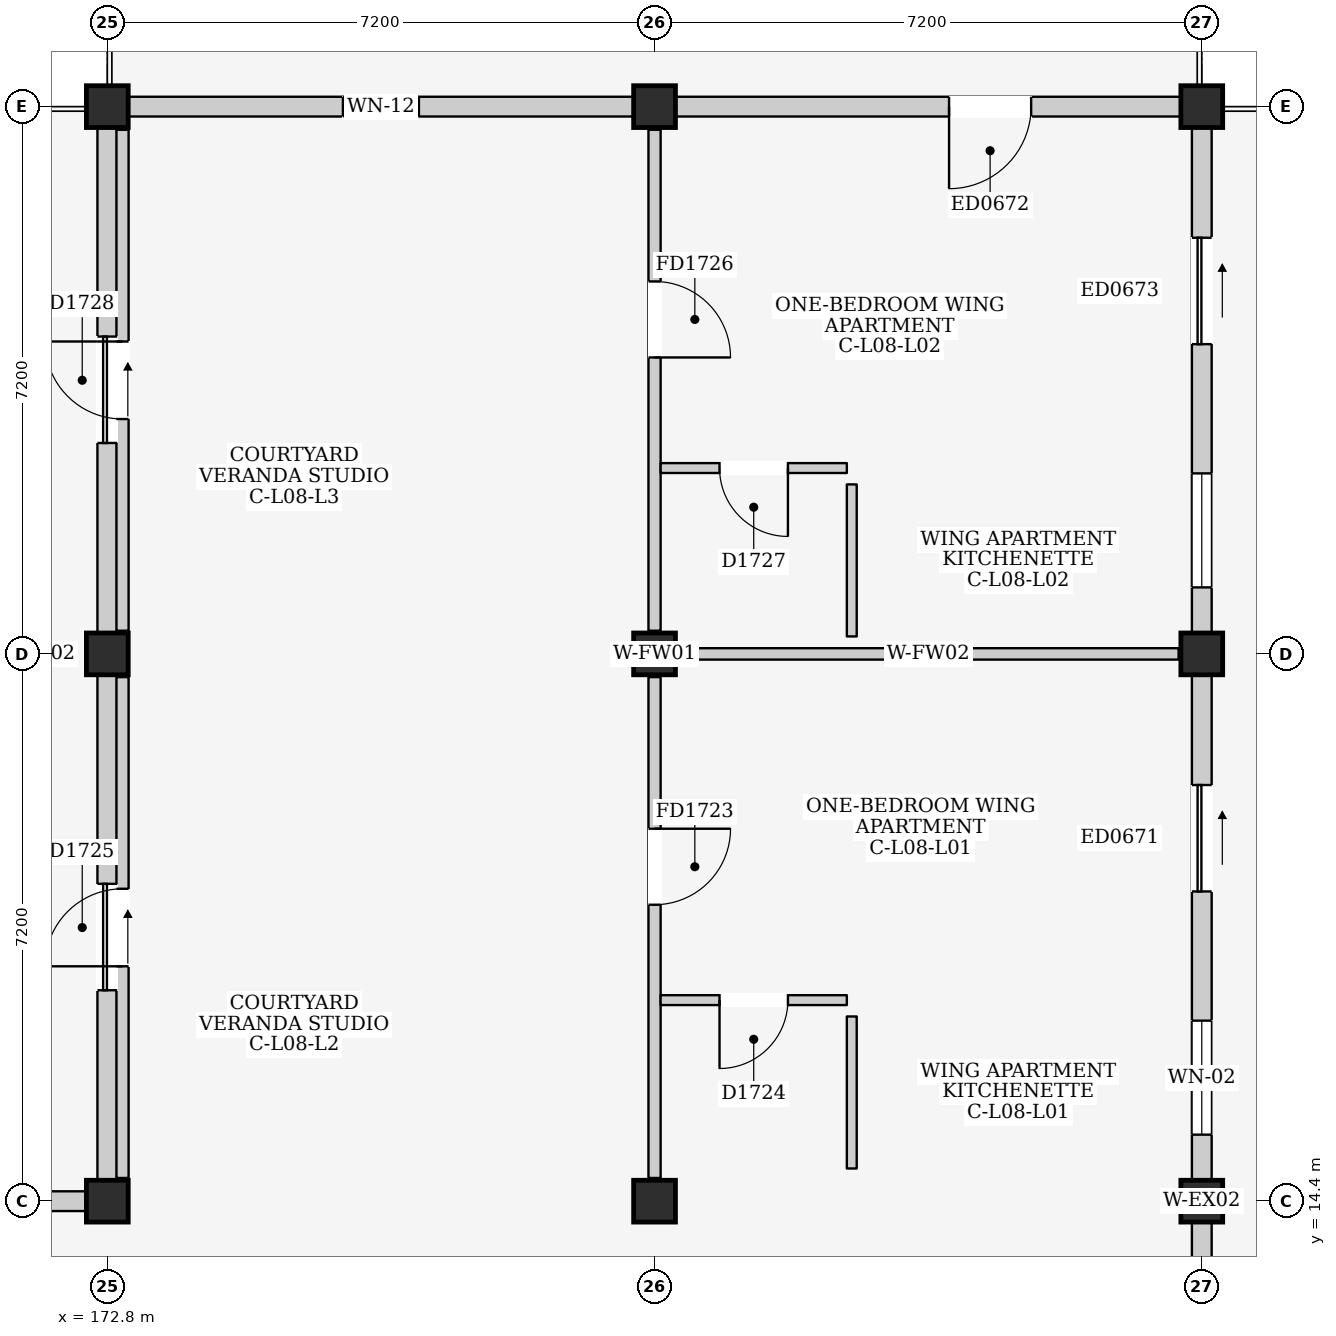
"""IFC4 building model, lengths in metres.
Left out: names, types, materials, properties, quantities, classifications, styles, units other than length and angle.
Written with IfcOpenShell. Run it as: python <this file> out.ifc"""

import sys

from ifc_helpers import new_model, si_unit, direction, frame, frame_2d, origin, origin_2d, place, context, subcontext, project, spatial, rectangle, extrude, element, fill, save


model = new_model("IFC4")
c1 = context("Model", 3, precision=1e-05, world=origin(), true_north=direction((0.0, 1.0)))
c2 = subcontext(c1, "Body", "Model", "MODEL_VIEW")
j1 = project(units=[si_unit("LENGTHUNIT", "METRE"), si_unit("PLANEANGLEUNIT", "RADIAN")], contexts=[c1])
p1 = place(None, origin())
s1 = spatial("IfcSite", under=j1, at=p1, CompositionType="ELEMENT")
p2 = place(p1, origin())
s2 = spatial("IfcBuilding", under=s1, at=p2, CompositionType="ELEMENT")
p3 = place(p2, frame((0.0, 0.0, 28.3)))
s3 = spatial("IfcBuildingStorey", under=s2, at=p3, CompositionType="ELEMENT", Elevation=28.3)
for number, where, z_axis, x_axis in (
    (1, (172.8, 14.4, 0.0), (0.0, 0.0, 1.0), (1.0, 0.0, 0.0)),
    (2, (172.8, 21.6, 0.0), (0.0, 0.0, 1.0), (1.0, 0.0, 0.0)),
    (3, (172.8, 28.8, 0.0), (0.0, 0.0, 1.0), (1.0, 0.0, 0.0)),
    (4, (180.0, 14.4, 0.0), (0.0, 0.0, 1.0), (1.0, 0.0, 0.0)),
    (5, (180.0, 21.6, 0.0), (0.0, 0.0, 1.0), (1.0, 0.0, 0.0)),
    (6, (180.0, 28.8, 0.0), (0.0, 0.0, 1.0), (1.0, 0.0, 0.0)),
    (7, (187.2, 14.4, 0.0), (0.0, 0.0, 1.0), (1.0, 0.0, 0.0)),
    (8, (187.2, 21.6, 0.0), (0.0, 0.0, 1.0), (1.0, 0.0, 0.0)),
    (9, (187.2, 28.8, 0.0), (0.0, 0.0, 1.0), (1.0, 0.0, 0.0)),
):
    element("IfcColumn", number, at=place(p3, frame(where, z_axis=z_axis, x_axis=x_axis)), inside=s3, PredefinedType="COLUMN", context=c2, shape_type="SweptSolid", body=[
        extrude(rectangle(XDim=0.55, YDim=0.55, at=origin_2d()), origin(), (0.0, 0.0, 1.0), 3.2),
    ])
p4 = place(p3, frame((165.875, 14.4, 0.0), z_axis=(0.0, 0.0, 1.0), x_axis=(1.0, 0.0, 0.0)))
e10 = element("IfcWall", 10, at=p4, inside=s3, PredefinedType="ELEMENTEDWALL", context=c2, shape_type="SweptSolid", body=[
    extrude(rectangle(XDim=6.65, YDim=0.26, at=frame_2d((3.325, 0.0))), origin(), (0.0, 0.0, 1.0), 2.335),
])
p5 = place(p4, frame((2.825, 0.0, 1.2)))
e11 = element("IfcOpeningElement", 11, at=p5, cuts=e10, PredefinedType="OPENING", context=c2, shape_type="SweptSolid", body=[
    extrude(rectangle(XDim=1.0, YDim=0.9, at=frame_2d((0.5, 0.45))), frame((0.0, 0.145, 0.0), z_axis=(0.0, -1.0, 0.0), x_axis=(1.0, 0.0, 0.0)), (0.0, 0.0, 1.0), 0.29),
])
p6 = place(p3, frame((172.8, 14.675, 0.0), z_axis=(0.0, 0.0, 1.0), x_axis=(0.0, 1.0, 0.0)))
e12 = element("IfcWall", 12, at=p6, inside=s3, PredefinedType="ELEMENTEDWALL", context=c2, shape_type="SweptSolid", body=[
    extrude(rectangle(XDim=6.65, YDim=0.26, at=frame_2d((3.325, 0.0))), origin(), (0.0, 0.0, 1.0), 2.435),
])
p7 = place(p6, frame((2.5, 0.0, 0.0)))
e13 = element("IfcOpeningElement", 13, at=p7, cuts=e12, PredefinedType="OPENING", context=c2, shape_type="SweptSolid", body=[
    extrude(rectangle(XDim=1.4, YDim=2.1, at=frame_2d((0.7, 1.05))), frame((0.0, 0.145, 0.0), z_axis=(0.0, -1.0, 0.0), x_axis=(1.0, 0.0, 0.0)), (0.0, 0.0, 1.0), 0.29),
])
p8 = place(p3, frame((173.075, 28.8, 0.0), z_axis=(0.0, 0.0, 1.0), x_axis=(1.0, 0.0, 0.0)))
e14 = element("IfcWall", 14, at=p8, inside=s3, PredefinedType="ELEMENTEDWALL", context=c2, shape_type="SweptSolid", body=[
    extrude(rectangle(XDim=6.65, YDim=0.26, at=frame_2d((3.325, 0.0))), origin(), (0.0, 0.0, 1.0), 2.335),
])
p9 = place(p8, frame((2.825, 0.0, 1.1)))
e15 = element("IfcOpeningElement", 15, at=p9, cuts=e14, PredefinedType="OPENING", context=c2, shape_type="SweptSolid", body=[
    extrude(rectangle(XDim=1.0, YDim=0.9, at=frame_2d((0.5, 0.45))), frame((0.0, 0.145, 0.0), z_axis=(0.0, -1.0, 0.0), x_axis=(1.0, 0.0, 0.0)), (0.0, 0.0, 1.0), 0.29),
])
p10 = place(p3, frame((172.8, 21.875, 0.0), z_axis=(0.0, 0.0, 1.0), x_axis=(0.0, 1.0, 0.0)))
e16 = element("IfcWall", 16, at=p10, inside=s3, PredefinedType="ELEMENTEDWALL", context=c2, shape_type="SweptSolid", body=[
    extrude(rectangle(XDim=6.65, YDim=0.26, at=frame_2d((3.325, 0.0))), origin(), (0.0, 0.0, 1.0), 2.435),
])
p11 = place(p10, frame((2.5, 0.0, 0.0)))
e17 = element("IfcOpeningElement", 17, at=p11, cuts=e16, PredefinedType="OPENING", context=c2, shape_type="SweptSolid", body=[
    extrude(rectangle(XDim=1.4, YDim=2.1, at=frame_2d((0.7, 1.05))), frame((0.0, 0.145, 0.0), z_axis=(0.0, -1.0, 0.0), x_axis=(1.0, 0.0, 0.0)), (0.0, 0.0, 1.0), 0.29),
])
p12 = place(p3, frame((187.2, 7.475, 0.0), z_axis=(0.0, 0.0, 1.0), x_axis=(0.0, 1.0, 0.0)))
e18 = element("IfcWall", 18, at=p12, inside=s3, PredefinedType="ELEMENTEDWALL", context=c2, shape_type="SweptSolid", body=[
    extrude(rectangle(XDim=6.65, YDim=0.26, at=frame_2d((3.325, 0.0))), origin(), (0.0, 0.0, 1.0), 2.485),
])
p13 = place(p12, frame((3.65, 0.0, 0.0)))
e19 = element("IfcOpeningElement", 19, at=p13, cuts=e18, PredefinedType="OPENING", context=c2, shape_type="SweptSolid", body=[
    extrude(rectangle(XDim=1.4, YDim=2.1, at=frame_2d((0.7, 1.05))), frame((0.0, 0.145, 0.0), z_axis=(0.0, -1.0, 0.0), x_axis=(1.0, 0.0, 0.0)), (0.0, 0.0, 1.0), 0.29),
])
p14 = place(p3, frame((187.2, 14.675, 0.0), z_axis=(0.0, 0.0, 1.0), x_axis=(0.0, 1.0, 0.0)))
e20 = element("IfcWall", 20, at=p14, inside=s3, PredefinedType="ELEMENTEDWALL", context=c2, shape_type="SweptSolid", body=[
    extrude(rectangle(XDim=6.65, YDim=0.26, at=frame_2d((3.325, 0.0))), origin(), (0.0, 0.0, 1.0), 2.485),
])
p15 = place(p14, frame((3.8, 0.0, 0.0)))
e21 = element("IfcOpeningElement", 21, at=p15, cuts=e20, PredefinedType="OPENING", context=c2, shape_type="SweptSolid", body=[
    extrude(rectangle(XDim=1.4, YDim=2.1, at=frame_2d((0.7, 1.05))), frame((0.0, 0.145, 0.0), z_axis=(0.0, -1.0, 0.0), x_axis=(1.0, 0.0, 0.0)), (0.0, 0.0, 1.0), 0.29),
])
p16 = place(p14, frame((0.6, 0.0, 0.875)))
e22 = element("IfcOpeningElement", 22, at=p16, cuts=e20, PredefinedType="OPENING", context=c2, shape_type="SweptSolid", body=[
    extrude(rectangle(XDim=1.5, YDim=1.5, at=frame_2d((0.75, 0.75))), frame((0.0, 0.145, 0.0), z_axis=(0.0, -1.0, 0.0), x_axis=(1.0, 0.0, 0.0)), (0.0, 0.0, 1.0), 0.29),
])
p17 = place(p3, frame((180.275, 28.8, 0.0), z_axis=(0.0, 0.0, 1.0), x_axis=(1.0, 0.0, 0.0)))
e23 = element("IfcWall", 23, at=p17, inside=s3, PredefinedType="ELEMENTEDWALL", context=c2, shape_type="SweptSolid", body=[
    extrude(rectangle(XDim=6.65, YDim=0.26, at=frame_2d((3.325, 0.0))), origin(), (0.0, 0.0, 1.0), 2.335),
])
p18 = place(p17, frame((3.6, 0.0, 0.0)))
e24 = element("IfcOpeningElement", 24, at=p18, cuts=e23, PredefinedType="OPENING", context=c2, shape_type="SweptSolid", body=[
    extrude(rectangle(XDim=1.08, YDim=2.12, at=frame_2d((0.54, 1.06))), frame((0.0, 0.145, 0.0), z_axis=(0.0, -1.0, 0.0), x_axis=(1.0, 0.0, 0.0)), (0.0, 0.0, 1.0), 0.29),
])
p19 = place(p3, frame((187.2, 21.875, 0.0), z_axis=(0.0, 0.0, 1.0), x_axis=(0.0, 1.0, 0.0)))
e25 = element("IfcWall", 25, at=p19, inside=s3, PredefinedType="ELEMENTEDWALL", context=c2, shape_type="SweptSolid", body=[
    extrude(rectangle(XDim=6.65, YDim=0.26, at=frame_2d((3.325, 0.0))), origin(), (0.0, 0.0, 1.0), 2.485),
])
p20 = place(p19, frame((3.8, 0.0, 0.0)))
e26 = element("IfcOpeningElement", 26, at=p20, cuts=e25, PredefinedType="OPENING", context=c2, shape_type="SweptSolid", body=[
    extrude(rectangle(XDim=1.4, YDim=2.1, at=frame_2d((0.7, 1.05))), frame((0.0, 0.145, 0.0), z_axis=(0.0, -1.0, 0.0), x_axis=(1.0, 0.0, 0.0)), (0.0, 0.0, 1.0), 0.29),
])
p21 = place(p19, frame((0.6, 0.0, 0.875)))
e27 = element("IfcOpeningElement", 27, at=p21, cuts=e25, PredefinedType="OPENING", context=c2, shape_type="SweptSolid", body=[
    extrude(rectangle(XDim=1.5, YDim=1.5, at=frame_2d((0.75, 0.75))), frame((0.0, 0.145, 0.0), z_axis=(0.0, -1.0, 0.0), x_axis=(1.0, 0.0, 0.0)), (0.0, 0.0, 1.0), 0.29),
])
p22 = place(p3, frame((180.0, 14.705, 0.0), z_axis=(0.0, 0.0, 1.0), x_axis=(0.0, 1.0, 0.0)))
e28 = element("IfcWall", 28, at=p22, inside=s3, PredefinedType="PARTITIONING", context=c2, shape_type="SweptSolid", body=[
    extrude(rectangle(XDim=6.59, YDim=0.16, at=frame_2d((3.295, 0.0))), origin(), (0.0, 0.0, 1.0), 2.435),
])
p23 = place(p22, frame((3.595, 0.0, 0.0)))
e29 = element("IfcOpeningElement", 29, at=p23, cuts=e28, PredefinedType="OPENING", context=c2, shape_type="SweptSolid", body=[
    extrude(rectangle(XDim=1.0, YDim=2.15, at=frame_2d((0.5, 1.075))), frame((0.0, 0.095, 0.0), z_axis=(0.0, -1.0, 0.0), x_axis=(1.0, 0.0, 0.0)), (0.0, 0.0, 1.0), 0.19),
])
p24 = place(p3, frame((180.305, 21.6, 0.0), z_axis=(0.0, 0.0, 1.0), x_axis=(1.0, 0.0, 0.0)))
e30 = element("IfcWall", 30, at=p24, inside=s3, PredefinedType="PARTITIONING", context=c2, shape_type="SweptSolid", body=[
    extrude(rectangle(XDim=6.59, YDim=0.15, at=frame_2d((3.295, 0.0))), origin(), (0.0, 0.0, 1.0), 2.335),
])
p25 = place(p3, frame((180.08, 17.045, 0.0), z_axis=(0.0, 0.0, 1.0), x_axis=(1.0, 0.0, 0.0)))
e31 = element("IfcWall", 31, at=p25, inside=s3, PredefinedType="PARTITIONING", context=c2, shape_type="SweptSolid", body=[
    extrude(rectangle(XDim=2.45, YDim=0.13, at=frame_2d((1.225, 0.0))), origin(), (0.0, 0.0, 1.0), 2.95),
])
p26 = place(p25, frame((0.775, 0.0, 0.0)))
e32 = element("IfcOpeningElement", 32, at=p26, cuts=e31, PredefinedType="OPENING", context=c2, shape_type="SweptSolid", body=[
    extrude(rectangle(XDim=0.9, YDim=2.1, at=frame_2d((0.45, 1.05))), frame((0.0, 0.08, 0.0), z_axis=(0.0, -1.0, 0.0), x_axis=(1.0, 0.0, 0.0)), (0.0, 0.0, 1.0), 0.16),
])
p27 = place(p3, frame((182.595, 14.83, 0.0), z_axis=(0.0, 0.0, 1.0), x_axis=(0.0, 1.0, 0.0)))
e33 = element("IfcWall", 33, at=p27, inside=s3, PredefinedType="PARTITIONING", context=c2, shape_type="SweptSolid", body=[
    extrude(rectangle(XDim=2.0, YDim=0.13, at=frame_2d((1.0, 0.0))), origin(), (0.0, 0.0, 1.0), 2.95),
])
p28 = place(p3, frame((173.0, 14.705, 0.0), z_axis=(0.0, 0.0, 1.0), x_axis=(0.0, 1.0, 0.0)))
e34 = element("IfcWall", 34, at=p28, inside=s3, PredefinedType="PARTITIONING", context=c2, shape_type="SweptSolid", body=[
    extrude(rectangle(XDim=6.59, YDim=0.16, at=frame_2d((3.295, 0.0))), origin(), (0.0, 0.0, 1.0), 2.95),
])
p29 = place(p28, frame((2.785, 0.0, 0.0)))
e35 = element("IfcOpeningElement", 35, at=p29, cuts=e34, PredefinedType="OPENING", context=c2, shape_type="SweptSolid", body=[
    extrude(rectangle(XDim=1.02, YDim=2.18, at=frame_2d((0.51, 1.09))), frame((0.0, 0.095, 0.0), z_axis=(0.0, -1.0, 0.0), x_axis=(1.0, 0.0, 0.0)), (0.0, 0.0, 1.0), 0.19),
])
p30 = place(p3, frame((180.0, 21.905, 0.0), z_axis=(0.0, 0.0, 1.0), x_axis=(0.0, 1.0, 0.0)))
e36 = element("IfcWall", 36, at=p30, inside=s3, PredefinedType="PARTITIONING", context=c2, shape_type="SweptSolid", body=[
    extrude(rectangle(XDim=6.59, YDim=0.16, at=frame_2d((3.295, 0.0))), origin(), (0.0, 0.0, 1.0), 2.435),
])
p31 = place(p30, frame((3.595, 0.0, 0.0)))
e37 = element("IfcOpeningElement", 37, at=p31, cuts=e36, PredefinedType="OPENING", context=c2, shape_type="SweptSolid", body=[
    extrude(rectangle(XDim=1.0, YDim=2.15, at=frame_2d((0.5, 1.075))), frame((0.0, 0.095, 0.0), z_axis=(0.0, -1.0, 0.0), x_axis=(1.0, 0.0, 0.0)), (0.0, 0.0, 1.0), 0.19),
])
p32 = place(p3, frame((180.08, 24.045, 0.0), z_axis=(0.0, 0.0, 1.0), x_axis=(1.0, 0.0, 0.0)))
e38 = element("IfcWall", 38, at=p32, inside=s3, PredefinedType="PARTITIONING", context=c2, shape_type="SweptSolid", body=[
    extrude(rectangle(XDim=2.45, YDim=0.13, at=frame_2d((1.225, 0.0))), origin(), (0.0, 0.0, 1.0), 2.95),
])
p33 = place(p32, frame((0.775, 0.0, 0.0)))
e39 = element("IfcOpeningElement", 39, at=p33, cuts=e38, PredefinedType="OPENING", context=c2, shape_type="SweptSolid", body=[
    extrude(rectangle(XDim=0.9, YDim=2.1, at=frame_2d((0.45, 1.05))), frame((0.0, 0.08, 0.0), z_axis=(0.0, -1.0, 0.0), x_axis=(1.0, 0.0, 0.0)), (0.0, 0.0, 1.0), 0.16),
])
p34 = place(p3, frame((182.595, 21.83, 0.0), z_axis=(0.0, 0.0, 1.0), x_axis=(0.0, 1.0, 0.0)))
e40 = element("IfcWall", 40, at=p34, inside=s3, PredefinedType="PARTITIONING", context=c2, shape_type="SweptSolid", body=[
    extrude(rectangle(XDim=2.0, YDim=0.13, at=frame_2d((1.0, 0.0))), origin(), (0.0, 0.0, 1.0), 2.95),
])
p35 = place(p3, frame((173.0, 21.905, 0.0), z_axis=(0.0, 0.0, 1.0), x_axis=(0.0, 1.0, 0.0)))
e41 = element("IfcWall", 41, at=p35, inside=s3, PredefinedType="PARTITIONING", context=c2, shape_type="SweptSolid", body=[
    extrude(rectangle(XDim=6.59, YDim=0.16, at=frame_2d((3.295, 0.0))), origin(), (0.0, 0.0, 1.0), 2.95),
])
p36 = place(p35, frame((2.785, 0.0, 0.0)))
e42 = element("IfcOpeningElement", 42, at=p36, cuts=e41, PredefinedType="OPENING", context=c2, shape_type="SweptSolid", body=[
    extrude(rectangle(XDim=1.02, YDim=2.18, at=frame_2d((0.51, 1.09))), frame((0.0, 0.095, 0.0), z_axis=(0.0, -1.0, 0.0), x_axis=(1.0, 0.0, 0.0)), (0.0, 0.0, 1.0), 0.19),
])
p37 = place(p7, frame((1.4, 0.0, 0.0), z_axis=(0.0, 0.0, 1.0), x_axis=(-1.0, 0.0, 0.0)))
e43 = element("IfcDoor", 43, at=p37, inside=s3, OperationType="SLIDING_TO_RIGHT", PredefinedType="DOOR", context=c2, shape_type="SweptSolid", body=[
    extrude(rectangle(XDim=1.4, YDim=2.1, at=frame_2d((0.7, 1.05))), frame((0.0, 0.025, 0.0), z_axis=(0.0, -1.0, 0.0), x_axis=(1.0, 0.0, 0.0)), (0.0, 0.0, 1.0), 0.05),
])
fill(e13, e43)
p38 = place(p9, origin())
e44 = element("IfcWindow", 44, at=p38, inside=s3, PartitioningType="SINGLE_PANEL", PredefinedType="WINDOW", context=c2, shape_type="SweptSolid", body=[
    extrude(rectangle(XDim=1.0, YDim=0.9, at=frame_2d((0.5, 0.45))), frame((0.0, 0.03, 0.0), z_axis=(0.0, -1.0, 0.0), x_axis=(1.0, 0.0, 0.0)), (0.0, 0.0, 1.0), 0.06),
])
fill(e15, e44)
p39 = place(p11, frame((1.4, 0.0, 0.0), z_axis=(0.0, 0.0, 1.0), x_axis=(-1.0, 0.0, 0.0)))
e45 = element("IfcDoor", 45, at=p39, inside=s3, OperationType="SLIDING_TO_RIGHT", PredefinedType="DOOR", context=c2, shape_type="SweptSolid", body=[
    extrude(rectangle(XDim=1.4, YDim=2.1, at=frame_2d((0.7, 1.05))), frame((0.0, 0.025, 0.0), z_axis=(0.0, -1.0, 0.0), x_axis=(1.0, 0.0, 0.0)), (0.0, 0.0, 1.0), 0.05),
])
fill(e17, e45)
p40 = place(p15, frame((1.4, 0.0, 0.0), z_axis=(0.0, 0.0, 1.0), x_axis=(-1.0, 0.0, 0.0)))
e46 = element("IfcDoor", 46, at=p40, inside=s3, OperationType="SLIDING_TO_RIGHT", PredefinedType="DOOR", context=c2, shape_type="SweptSolid", body=[
    extrude(rectangle(XDim=1.4, YDim=2.1, at=frame_2d((0.7, 1.05))), frame((0.0, 0.025, 0.0), z_axis=(0.0, -1.0, 0.0), x_axis=(1.0, 0.0, 0.0)), (0.0, 0.0, 1.0), 0.05),
])
fill(e21, e46)
p41 = place(p16, origin())
e47 = element("IfcWindow", 47, at=p41, inside=s3, PartitioningType="DOUBLE_PANEL_VERTICAL", PredefinedType="WINDOW", context=c2, shape_type="SweptSolid", body=[
    extrude(rectangle(XDim=1.5, YDim=1.5, at=frame_2d((0.75, 0.75))), frame((0.0, 0.03, 0.0), z_axis=(0.0, -1.0, 0.0), x_axis=(1.0, 0.0, 0.0)), (0.0, 0.0, 1.0), 0.06),
])
fill(e22, e47)
p42 = place(p18, frame((1.08, 0.0, 0.0), z_axis=(0.0, 0.0, 1.0), x_axis=(-1.0, 0.0, 0.0)))
e48 = element("IfcDoor", 48, at=p42, inside=s3, OperationType="SINGLE_SWING_RIGHT", PredefinedType="DOOR", context=c2, shape_type="SweptSolid", body=[
    extrude(rectangle(XDim=1.08, YDim=2.12, at=frame_2d((0.54, 1.06))), frame((0.0, 0.025, 0.0), z_axis=(0.0, -1.0, 0.0), x_axis=(1.0, 0.0, 0.0)), (0.0, 0.0, 1.0), 0.05),
])
fill(e24, e48)
p43 = place(p20, frame((1.4, 0.0, 0.0), z_axis=(0.0, 0.0, 1.0), x_axis=(-1.0, 0.0, 0.0)))
e49 = element("IfcDoor", 49, at=p43, inside=s3, OperationType="SLIDING_TO_RIGHT", PredefinedType="DOOR", context=c2, shape_type="SweptSolid", body=[
    extrude(rectangle(XDim=1.4, YDim=2.1, at=frame_2d((0.7, 1.05))), frame((0.0, 0.025, 0.0), z_axis=(0.0, -1.0, 0.0), x_axis=(1.0, 0.0, 0.0)), (0.0, 0.0, 1.0), 0.05),
])
fill(e26, e49)
p44 = place(p21, origin())
e50 = element("IfcWindow", 50, at=p44, inside=s3, PartitioningType="DOUBLE_PANEL_VERTICAL", PredefinedType="WINDOW", context=c2, shape_type="SweptSolid", body=[
    extrude(rectangle(XDim=1.5, YDim=1.5, at=frame_2d((0.75, 0.75))), frame((0.0, 0.03, 0.0), z_axis=(0.0, -1.0, 0.0), x_axis=(1.0, 0.0, 0.0)), (0.0, 0.0, 1.0), 0.06),
])
fill(e27, e50)
p45 = place(p23, frame((1.0, 0.0, 0.0), z_axis=(0.0, 0.0, 1.0), x_axis=(-1.0, 0.0, 0.0)))
e51 = element("IfcDoor", 51, at=p45, inside=s3, OperationType="SINGLE_SWING_LEFT", PredefinedType="DOOR", context=c2, shape_type="SweptSolid", body=[
    extrude(rectangle(XDim=1.0, YDim=2.15, at=frame_2d((0.5, 1.075))), frame((0.0, 0.025, 0.0), z_axis=(0.0, -1.0, 0.0), x_axis=(1.0, 0.0, 0.0)), (0.0, 0.0, 1.0), 0.05),
])
fill(e29, e51)
p46 = place(p26, frame((0.9, 0.0, 0.0), z_axis=(0.0, 0.0, 1.0), x_axis=(-1.0, 0.0, 0.0)))
e52 = element("IfcDoor", 52, at=p46, inside=s3, OperationType="SINGLE_SWING_RIGHT", PredefinedType="DOOR", context=c2, shape_type="SweptSolid", body=[
    extrude(rectangle(XDim=0.9, YDim=2.1, at=frame_2d((0.45, 1.05))), frame((0.0, 0.025, 0.0), z_axis=(0.0, -1.0, 0.0), x_axis=(1.0, 0.0, 0.0)), (0.0, 0.0, 1.0), 0.05),
])
fill(e32, e52)
p47 = place(p29, origin())
e53 = element("IfcDoor", 53, at=p47, inside=s3, OperationType="SINGLE_SWING_LEFT", PredefinedType="DOOR", context=c2, shape_type="SweptSolid", body=[
    extrude(rectangle(XDim=1.02, YDim=2.18, at=frame_2d((0.51, 1.09))), frame((0.0, 0.025, 0.0), z_axis=(0.0, -1.0, 0.0), x_axis=(1.0, 0.0, 0.0)), (0.0, 0.0, 1.0), 0.05),
])
fill(e35, e53)
p48 = place(p31, frame((1.0, 0.0, 0.0), z_axis=(0.0, 0.0, 1.0), x_axis=(-1.0, 0.0, 0.0)))
e54 = element("IfcDoor", 54, at=p48, inside=s3, OperationType="SINGLE_SWING_RIGHT", PredefinedType="DOOR", context=c2, shape_type="SweptSolid", body=[
    extrude(rectangle(XDim=1.0, YDim=2.15, at=frame_2d((0.5, 1.075))), frame((0.0, 0.025, 0.0), z_axis=(0.0, -1.0, 0.0), x_axis=(1.0, 0.0, 0.0)), (0.0, 0.0, 1.0), 0.05),
])
fill(e37, e54)
p49 = place(p33, frame((0.9, 0.0, 0.0), z_axis=(0.0, 0.0, 1.0), x_axis=(-1.0, 0.0, 0.0)))
e55 = element("IfcDoor", 55, at=p49, inside=s3, OperationType="SINGLE_SWING_LEFT", PredefinedType="DOOR", context=c2, shape_type="SweptSolid", body=[
    extrude(rectangle(XDim=0.9, YDim=2.1, at=frame_2d((0.45, 1.05))), frame((0.0, 0.025, 0.0), z_axis=(0.0, -1.0, 0.0), x_axis=(1.0, 0.0, 0.0)), (0.0, 0.0, 1.0), 0.05),
])
fill(e39, e55)
p50 = place(p36, origin())
e56 = element("IfcDoor", 56, at=p50, inside=s3, OperationType="SINGLE_SWING_RIGHT", PredefinedType="DOOR", context=c2, shape_type="SweptSolid", body=[
    extrude(rectangle(XDim=1.02, YDim=2.18, at=frame_2d((0.51, 1.09))), frame((0.0, 0.025, 0.0), z_axis=(0.0, -1.0, 0.0), x_axis=(1.0, 0.0, 0.0)), (0.0, 0.0, 1.0), 0.05),
])
fill(e42, e56)
save(model, sys.argv[1])
